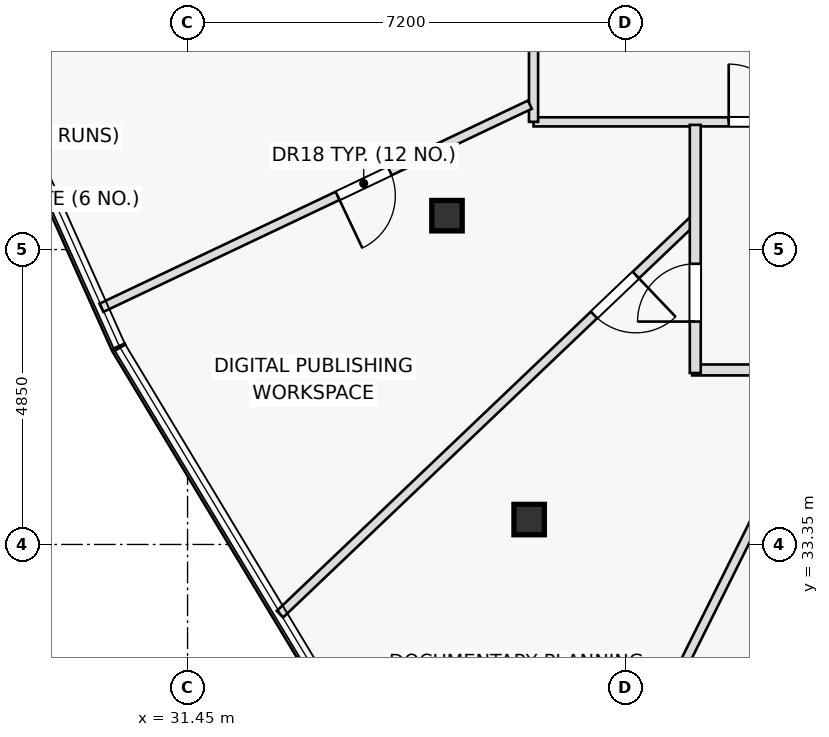
"""IFC4 building model, lengths in metres.
Left out: names, types, materials, properties, quantities, classifications, styles, units other than length and angle.
Written with IfcOpenShell. Run it as: python <this file> out.ifc"""

import sys

from ifc_helpers import new_model, si_unit, direction, frame, frame_2d, origin, origin_2d, place, context, subcontext, project, spatial, rectangle, hollow_rectangle, extrude, element, fill, save


model = new_model("IFC4")
c1 = context("Model", 3, precision=1e-05, world=origin(), true_north=direction((0.0, 1.0)))
c2 = subcontext(c1, "Body", "Model", "MODEL_VIEW")
j1 = project(units=[si_unit("LENGTHUNIT", "METRE"), si_unit("PLANEANGLEUNIT", "RADIAN")], contexts=[c1])
p1 = place(None, origin())
s1 = spatial("IfcSite", under=j1, at=p1, CompositionType="ELEMENT")
p2 = place(p1, origin())
s2 = spatial("IfcBuilding", under=s1, at=p2, CompositionType="ELEMENT")
p3 = place(p2, frame((0.0, 0.0, 285.5)))
s3 = spatial("IfcBuildingStorey", under=s2, at=p3, CompositionType="ELEMENT", Elevation=285.5)
for number, where, z_axis, x_axis in (
    (1, (35.717, 38.757, 0.0), (0.0, 0.0, 1.0), (1.0, 0.0, 0.0)),
    (2, (37.068, 33.76, 0.0), (0.0, 0.0, 1.0), (1.0, 0.0, 0.0)),
):
    element("IfcColumn", number, at=place(p3, frame(where, z_axis=z_axis, x_axis=x_axis)), inside=s3, PredefinedType="COLUMN", context=c2, shape_type="SweptSolid", body=[
        extrude(hollow_rectangle(XDim=0.5, YDim=0.5, WallThickness=0.03, at=origin_2d()), origin(), (0.0, 0.0, 1.0), 3.7),
    ])
p4 = place(p3, frame((37.14, 40.3, 0.0), z_axis=(0.0, 0.0, 1.0), x_axis=(1.0, 0.0, 0.0)))
e3 = element("IfcWall", 3, at=p4, inside=s3, PredefinedType="PARTITIONING", context=c2, shape_type="SweptSolid", body=[
    extrude(rectangle(XDim=5.76, YDim=0.15, at=frame_2d((2.88, 0.0))), origin(), (0.0, 0.0, 1.0), 3.175),
])
p5 = place(p4, frame((3.21, 0.0, 0.0)))
e4 = element("IfcOpeningElement", 4, at=p5, cuts=e3, PredefinedType="OPENING", context=c2, shape_type="SweptSolid", body=[
    extrude(rectangle(XDim=0.95, YDim=2.05, at=frame_2d((0.475, 1.025))), frame((0.0, 0.085, 0.0), z_axis=(0.0, -1.0, 0.0), x_axis=(1.0, 0.0, 0.0)), (0.0, 0.0, 1.0), 0.17),
])
p6 = place(p3, frame((37.14, 40.3, 0.0), z_axis=(0.0, 0.0, 1.0), x_axis=(0.0, 1.0, 0.0)))
e5 = element("IfcWall", 5, at=p6, inside=s3, PredefinedType="PARTITIONING", context=c2, shape_type="SweptSolid", body=[
    extrude(rectangle(XDim=7.58, YDim=0.15, at=frame_2d((3.79, 0.0))), origin(), (0.0, 0.0, 1.0), 3.7),
])
p7 = place(p3, frame((37.08, 40.583, 0.0), z_axis=(0.0, 0.0, 1.0), x_axis=(-0.903622418397, -0.428329925372, 0.0)))
e6 = element("IfcWall", 6, at=p7, inside=s3, PredefinedType="PARTITIONING", context=c2, shape_type="SweptSolid", body=[
    extrude(rectangle(XDim=7.798, YDim=0.15, at=frame_2d((3.899, 0.0))), origin(), (0.0, 0.0, 1.0), 3.235),
])
p8 = place(p7, frame((2.55, 0.0, 0.0)))
e7 = element("IfcOpeningElement", 7, at=p8, cuts=e6, PredefinedType="OPENING", context=c2, shape_type="SweptSolid", body=[
    extrude(rectangle(XDim=0.95, YDim=2.05, at=frame_2d((0.475, 1.025))), frame((0.0, 0.085, 0.0), z_axis=(0.0, -1.0, 0.0), x_axis=(1.0, 0.0, 0.0)), (0.0, 0.0, 1.0), 0.17),
])
p9 = place(p3, frame((39.8, 38.712, 0.0), z_axis=(0.0, 0.0, 1.0), x_axis=(-0.723993287643, -0.68980701609, 0.0)))
e8 = element("IfcWall", 8, at=p9, inside=s3, PredefinedType="PARTITIONING", context=c2, shape_type="SweptSolid", body=[
    extrude(rectangle(XDim=9.434, YDim=0.15, at=frame_2d((4.717, 0.0))), origin(), (0.0, 0.0, 1.0), 3.235),
])
p10 = place(p9, frame((1.35, 0.0, 0.0)))
e9 = element("IfcOpeningElement", 9, at=p10, cuts=e8, PredefinedType="OPENING", context=c2, shape_type="SweptSolid", body=[
    extrude(rectangle(XDim=0.95, YDim=2.05, at=frame_2d((0.475, 1.025))), frame((0.0, 0.085, 0.0), z_axis=(0.0, -1.0, 0.0), x_axis=(1.0, 0.0, 0.0)), (0.0, 0.0, 1.0), 0.17),
])
p11 = place(p3, frame((42.023, 36.22, 0.0), z_axis=(0.0, 0.0, 1.0), x_axis=(-0.446122520894, -0.894971896962, 0.0)))
e10 = element("IfcWall", 10, at=p11, inside=s3, PredefinedType="PARTITIONING", context=c2, shape_type="SweptSolid", body=[
    extrude(rectangle(XDim=10.833, YDim=0.15, at=frame_2d((5.417, 0.0))), origin(), (0.0, 0.0, 1.0), 3.235),
])
p12 = place(p3, frame((59.23, 36.22, 0.0), z_axis=(0.0, 0.0, 1.0), x_axis=(-1.0, 0.0, 0.0)))
e11 = element("IfcWall", 11, at=p12, inside=s3, PredefinedType="PARTITIONING", context=c2, shape_type="SweptSolid", body=[
    extrude(rectangle(XDim=19.48, YDim=0.18, at=frame_2d((9.74, 0.0))), origin(), (0.0, 0.0, 1.0), 3.175),
])
p13 = place(p12, frame((3.955, 0.0, 0.0)))
e12 = element("IfcOpeningElement", 12, at=p13, cuts=e11, PredefinedType="OPENING", context=c2, shape_type="SweptSolid", body=[
    extrude(rectangle(XDim=0.95, YDim=2.05, at=frame_2d((0.475, 1.025))), frame((0.0, 0.1, 0.0), z_axis=(0.0, -1.0, 0.0), x_axis=(1.0, 0.0, 0.0)), (0.0, 0.0, 1.0), 0.2),
])
p14 = place(p12, frame((9.21, 0.0, 0.0)))
e13 = element("IfcOpeningElement", 13, at=p14, cuts=e11, PredefinedType="OPENING", context=c2, shape_type="SweptSolid", body=[
    extrude(rectangle(XDim=0.95, YDim=2.05, at=frame_2d((0.475, 1.025))), frame((0.0, 0.1, 0.0), z_axis=(0.0, -1.0, 0.0), x_axis=(1.0, 0.0, 0.0)), (0.0, 0.0, 1.0), 0.2),
])
p15 = place(p12, frame((13.622, 0.0, 0.0)))
e14 = element("IfcOpeningElement", 14, at=p15, cuts=e11, PredefinedType="OPENING", context=c2, shape_type="SweptSolid", body=[
    extrude(rectangle(XDim=0.95, YDim=2.05, at=frame_2d((0.475, 1.025))), frame((0.0, 0.1, 0.0), z_axis=(0.0, -1.0, 0.0), x_axis=(1.0, 0.0, 0.0)), (0.0, 0.0, 1.0), 0.2),
])
p16 = place(p3, frame((39.8, 36.17, 0.0), z_axis=(0.0, 0.0, 1.0), x_axis=(0.0, 1.0, 0.0)))
e15 = element("IfcWall", 15, at=p16, inside=s3, PredefinedType="PARTITIONING", context=c2, shape_type="SweptSolid", body=[
    extrude(rectangle(XDim=4.08, YDim=0.18, at=frame_2d((2.04, 0.0))), origin(), (0.0, 0.0, 1.0), 3.435),
])
p17 = place(p16, frame((0.845, 0.0, 0.0)))
e16 = element("IfcOpeningElement", 16, at=p17, cuts=e15, PredefinedType="OPENING", context=c2, shape_type="SweptSolid", body=[
    extrude(rectangle(XDim=0.95, YDim=2.05, at=frame_2d((0.475, 1.025))), frame((0.0, 0.1, 0.0), z_axis=(0.0, -1.0, 0.0), x_axis=(1.0, 0.0, 0.0)), (0.0, 0.0, 1.0), 0.2),
])
p18 = place(p5, origin())
e17 = element("IfcDoor", 17, at=p18, inside=s3, OperationType="SINGLE_SWING_LEFT", PredefinedType="DOOR", context=c2, shape_type="SweptSolid", body=[
    extrude(rectangle(XDim=0.95, YDim=2.05, at=frame_2d((0.475, 1.025))), frame((0.0, 0.025, 0.0), z_axis=(0.0, -1.0, 0.0), x_axis=(1.0, 0.0, 0.0)), (0.0, 0.0, 1.0), 0.05),
])
fill(e4, e17)
p19 = place(p8, origin())
e18 = element("IfcDoor", 18, at=p19, inside=s3, OperationType="SINGLE_SWING_RIGHT", PredefinedType="DOOR", context=c2, shape_type="SweptSolid", body=[
    extrude(rectangle(XDim=0.95, YDim=2.05, at=frame_2d((0.475, 1.025))), frame((0.0, 0.025, 0.0), z_axis=(0.0, -1.0, 0.0), x_axis=(1.0, 0.0, 0.0)), (0.0, 0.0, 1.0), 0.05),
])
fill(e7, e18)
p20 = place(p10, origin())
e19 = element("IfcDoor", 19, at=p20, inside=s3, OperationType="SINGLE_SWING_LEFT", PredefinedType="DOOR", context=c2, shape_type="SweptSolid", body=[
    extrude(rectangle(XDim=0.95, YDim=2.05, at=frame_2d((0.475, 1.025))), frame((0.0, 0.025, 0.0), z_axis=(0.0, -1.0, 0.0), x_axis=(1.0, 0.0, 0.0)), (0.0, 0.0, 1.0), 0.05),
])
fill(e9, e19)
p21 = place(p17, origin())
e20 = element("IfcDoor", 20, at=p21, inside=s3, OperationType="SINGLE_SWING_LEFT", PredefinedType="DOOR", context=c2, shape_type="SweptSolid", body=[
    extrude(rectangle(XDim=0.95, YDim=2.05, at=frame_2d((0.475, 1.025))), frame((0.0, 0.025, 0.0), z_axis=(0.0, -1.0, 0.0), x_axis=(1.0, 0.0, 0.0)), (0.0, 0.0, 1.0), 0.05),
])
fill(e16, e20)
save(model, sys.argv[1])
